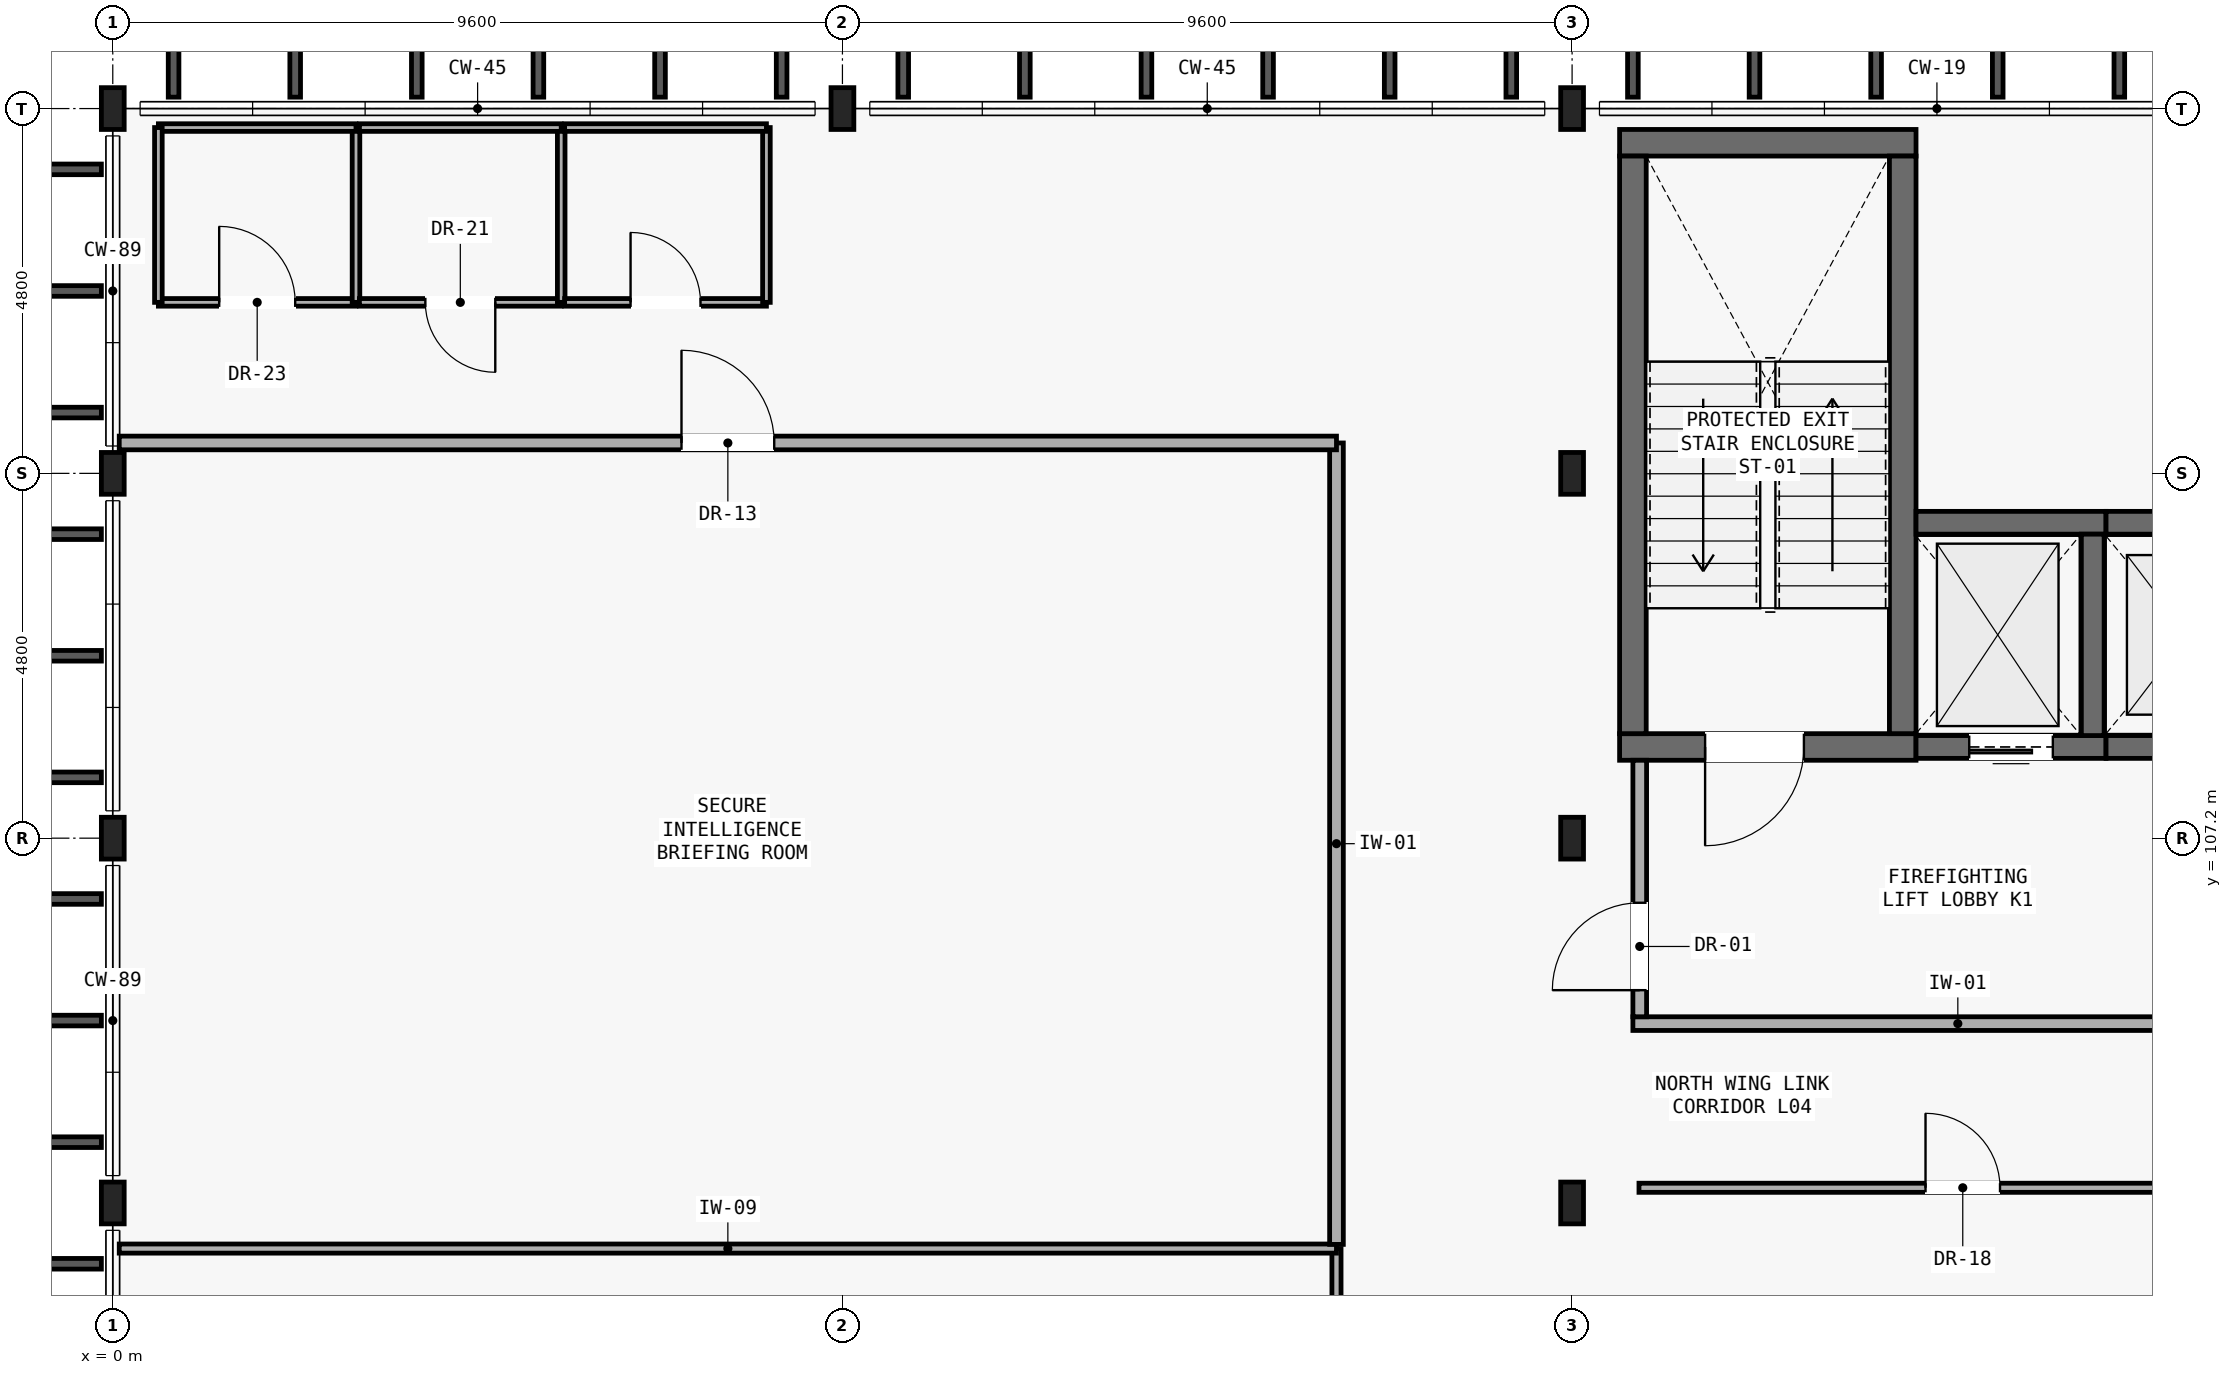
"""IFC4 building model, lengths in metres.
Left out: names, types, materials, properties, quantities, classifications, styles, units other than length and angle.
Written with IfcOpenShell. Run it as: python <this file> out.ifc"""

import sys

from ifc_helpers import new_model, si_unit, direction, frame, frame_2d, origin, origin_2d, place, context, subcontext, project, spatial, rectangle, i_section, extrude, element, fill, save


model = new_model("IFC4")
c1 = context("Model", 3, precision=1e-05, world=origin(), true_north=direction((0.0, 1.0)))
c2 = subcontext(c1, "Body", "Model", "MODEL_VIEW")
j1 = project(units=[si_unit("LENGTHUNIT", "METRE"), si_unit("PLANEANGLEUNIT", "RADIAN")], contexts=[c1])
p1 = place(None, origin())
s1 = spatial("IfcSite", under=j1, at=p1, CompositionType="ELEMENT")
p2 = place(p1, origin())
s2 = spatial("IfcBuilding", under=s1, at=p2, CompositionType="ELEMENT")
p3 = place(p2, frame((0.0, 0.0, 17.85)))
s3 = spatial("IfcBuildingStorey", under=s2, at=p3, CompositionType="ELEMENT", Elevation=17.85)
for number, where, z_axis, x_axis in (
    (1, (0.0, 102.4, 0.0), (0.0, 0.0, 1.0), (1.0, 0.0, 0.0)),
    (2, (0.0, 107.2, 0.0), (0.0, 0.0, 1.0), (1.0, 0.0, 0.0)),
    (3, (0.0, 112.0, 0.0), (0.0, 0.0, 1.0), (1.0, 0.0, 0.0)),
    (4, (0.0, 116.8, 0.0), (0.0, 0.0, 1.0), (1.0, 0.0, 0.0)),
    (5, (9.6, 116.8, 0.0), (0.0, 0.0, 1.0), (1.0, 0.0, 0.0)),
    (6, (19.2, 116.8, 0.0), (0.0, 0.0, 1.0), (1.0, 0.0, 0.0)),
    (7, (19.2, 102.4, 0.0), (0.0, 0.0, 1.0), (1.0, 0.0, 0.0)),
    (8, (19.2, 107.2, 0.0), (0.0, 0.0, 1.0), (1.0, 0.0, 0.0)),
    (9, (19.2, 112.0, 0.0), (0.0, 0.0, 1.0), (1.0, 0.0, 0.0)),
):
    element("IfcColumn", number, at=place(p3, frame(where, z_axis=z_axis, x_axis=x_axis)), inside=s3, PredefinedType="COLUMN", context=c2, shape_type="SweptSolid", body=[
        extrude(i_section(OverallWidth=0.3, OverallDepth=0.55, WebThickness=0.015, FlangeThickness=0.029, FilletRadius=0.027, at=origin_2d()), origin(), (0.0, 0.0, 1.0), 4.2),
    ])
p4 = place(p3, frame((19.825, 108.4, 0.0), z_axis=(0.0, 0.0, 1.0), x_axis=(1.0, 0.0, 0.0)))
e10 = element("IfcWall", 10, at=p4, inside=s3, PredefinedType="SHEAR", context=c2, shape_type="SweptSolid", body=[
    extrude(rectangle(XDim=3.9, YDim=0.35, at=frame_2d((1.95, 0.0))), origin(), (0.0, 0.0, 1.0), 3.99),
])
p5 = place(p4, frame((1.125, 0.0, 0.0)))
e11 = element("IfcOpeningElement", 11, at=p5, cuts=e10, PredefinedType="OPENING", context=c2, shape_type="SweptSolid", body=[
    extrude(rectangle(XDim=1.3, YDim=2.15, at=frame_2d((0.65, 1.075))), frame((0.0, 0.185, 0.0), z_axis=(0.0, -1.0, 0.0), x_axis=(1.0, 0.0, 0.0)), (0.0, 0.0, 1.0), 0.37),
])
p6 = place(p3, frame((19.825, 116.35, 0.0), z_axis=(0.0, 0.0, 1.0), x_axis=(1.0, 0.0, 0.0)))
e12 = element("IfcWall", 12, at=p6, inside=s3, PredefinedType="SHEAR", context=c2, shape_type="SweptSolid", body=[
    extrude(rectangle(XDim=3.9, YDim=0.35, at=frame_2d((1.95, 0.0))), origin(), (0.0, 0.0, 1.0), 3.99),
])
for number, where, z_axis, x_axis in (
    (13, (20.0, 108.575, 0.0), (0.0, 0.0, 1.0), (0.0, 1.0, 0.0)),
    (14, (23.55, 108.575, 0.0), (0.0, 0.0, 1.0), (0.0, 1.0, 0.0)),
):
    element("IfcWall", number, at=place(p3, frame(where, z_axis=z_axis, x_axis=x_axis)), inside=s3, PredefinedType="SHEAR", context=c2, shape_type="SweptSolid", body=[
        extrude(rectangle(XDim=7.6, YDim=0.35, at=frame_2d((3.8, 0.0))), origin(), (0.0, 0.0, 1.0), 3.99),
    ])
p7 = place(p3, frame((23.725, 108.4, 0.0), z_axis=(0.0, 0.0, 1.0), x_axis=(1.0, 0.0, 0.0)))
e15 = element("IfcWall", 15, at=p7, inside=s3, PredefinedType="SHEAR", context=c2, shape_type="SweptSolid", body=[
    extrude(rectangle(XDim=2.5, YDim=0.3, at=frame_2d((1.25, 0.0))), origin(), (0.0, 0.0, 1.0), 3.99),
])
p8 = place(p7, frame((0.7, 0.0, 0.0)))
e16 = element("IfcOpeningElement", 16, at=p8, cuts=e15, PredefinedType="OPENING", context=c2, shape_type="SweptSolid", body=[
    extrude(rectangle(XDim=1.1, YDim=2.1, at=frame_2d((0.55, 1.05))), frame((0.0, 0.16, 0.0), z_axis=(0.0, -1.0, 0.0), x_axis=(1.0, 0.0, 0.0)), (0.0, 0.0, 1.0), 0.32),
])
p9 = place(p3, frame((23.725, 111.35, 0.0), z_axis=(0.0, 0.0, 1.0), x_axis=(1.0, 0.0, 0.0)))
e17 = element("IfcWall", 17, at=p9, inside=s3, PredefinedType="SHEAR", context=c2, shape_type="SweptSolid", body=[
    extrude(rectangle(XDim=2.5, YDim=0.3, at=frame_2d((1.25, 0.0))), origin(), (0.0, 0.0, 1.0), 3.99),
])
p10 = place(p3, frame((26.05, 108.55, 0.0), z_axis=(0.0, 0.0, 1.0), x_axis=(0.0, 1.0, 0.0)))
e18 = element("IfcWall", 18, at=p10, inside=s3, PredefinedType="SHEAR", context=c2, shape_type="SweptSolid", body=[
    extrude(rectangle(XDim=2.65, YDim=0.3, at=frame_2d((1.325, 0.0))), origin(), (0.0, 0.0, 1.0), 3.99),
])
p11 = place(p3, frame((26.225, 108.4, 0.0), z_axis=(0.0, 0.0, 1.0), x_axis=(1.0, 0.0, 0.0)))
e19 = element("IfcWall", 19, at=p11, inside=s3, PredefinedType="SHEAR", context=c2, shape_type="SweptSolid", body=[
    extrude(rectangle(XDim=2.5, YDim=0.3, at=frame_2d((1.25, 0.0))), origin(), (0.0, 0.0, 1.0), 3.99),
])
p12 = place(p11, frame((0.7, 0.0, 0.0)))
e20 = element("IfcOpeningElement", 20, at=p12, cuts=e19, PredefinedType="OPENING", context=c2, shape_type="SweptSolid", body=[
    extrude(rectangle(XDim=1.1, YDim=2.1, at=frame_2d((0.55, 1.05))), frame((0.0, 0.16, 0.0), z_axis=(0.0, -1.0, 0.0), x_axis=(1.0, 0.0, 0.0)), (0.0, 0.0, 1.0), 0.32),
])
p13 = place(p3, frame((26.225, 111.35, 0.0), z_axis=(0.0, 0.0, 1.0), x_axis=(1.0, 0.0, 0.0)))
e21 = element("IfcWall", 21, at=p13, inside=s3, PredefinedType="SHEAR", context=c2, shape_type="SweptSolid", body=[
    extrude(rectangle(XDim=2.5, YDim=0.3, at=frame_2d((1.25, 0.0))), origin(), (0.0, 0.0, 1.0), 3.99),
])
p14 = place(p3, frame((20.0, 104.76, 0.0), z_axis=(0.0, 0.0, 1.0), x_axis=(1.0, 0.0, 0.0)))
e22 = element("IfcWall", 22, at=p14, inside=s3, PredefinedType="PARTITIONING", context=c2, shape_type="SweptSolid", body=[
    extrude(rectangle(XDim=8.55, YDim=0.18, at=frame_2d((4.275, 0.0))), origin(), (0.0, 0.0, 1.0), 3.47),
])
p15 = place(p3, frame((20.09, 104.85, 0.0), z_axis=(0.0, 0.0, 1.0), x_axis=(0.0, 1.0, 0.0)))
e23 = element("IfcWall", 23, at=p15, inside=s3, PredefinedType="PARTITIONING", context=c2, shape_type="SweptSolid", body=[
    extrude(rectangle(XDim=3.375, YDim=0.18, at=frame_2d((1.688, 0.0))), origin(), (0.0, 0.0, 1.0), 3.99),
])
p16 = place(p15, frame((0.35, 0.0, 0.0)))
e24 = element("IfcOpeningElement", 24, at=p16, cuts=e23, PredefinedType="OPENING", context=c2, shape_type="SweptSolid", body=[
    extrude(rectangle(XDim=1.15, YDim=2.15, at=frame_2d((0.575, 1.075))), frame((0.0, 0.1, 0.0), z_axis=(0.0, -1.0, 0.0), x_axis=(1.0, 0.0, 0.0)), (0.0, 0.0, 1.0), 0.2),
])
p17 = place(p3, frame((16.1, 83.4, 0.0), z_axis=(0.0, 0.0, 1.0), x_axis=(0.0, 1.0, 0.0)))
e25 = element("IfcWall", 25, at=p17, inside=s3, PredefinedType="PARTITIONING", context=c2, shape_type="SweptSolid", body=[
    extrude(rectangle(XDim=18.4, YDim=0.12, at=frame_2d((9.2, 0.0))), origin(), (0.0, 0.0, 1.0), 3.99),
])
p18 = place(p17, frame((8.69, 0.0, 0.0)))
e26 = element("IfcOpeningElement", 26, at=p18, cuts=e25, PredefinedType="OPENING", context=c2, shape_type="SweptSolid", body=[
    extrude(rectangle(XDim=1.02, YDim=2.1, at=frame_2d((0.51, 1.05))), frame((0.0, 0.07, 0.0), z_axis=(0.0, -1.0, 0.0), x_axis=(1.0, 0.0, 0.0)), (0.0, 0.0, 1.0), 0.14),
])
p19 = place(p3, frame((16.1, 101.8, 0.0), z_axis=(0.0, 0.0, 1.0), x_axis=(-1.0, 0.0, 0.0)))
e27 = element("IfcWall", 27, at=p19, inside=s3, PredefinedType="PARTITIONING", context=c2, shape_type="SweptSolid", body=[
    extrude(rectangle(XDim=16.015, YDim=0.12, at=frame_2d((8.008, 0.0))), origin(), (0.0, 0.0, 1.0), 3.99),
])
p20 = place(p3, frame((16.1, 101.855, 0.0), z_axis=(0.0, 0.0, 1.0), x_axis=(0.0, 1.0, 0.0)))
e28 = element("IfcWall", 28, at=p20, inside=s3, PredefinedType="PARTITIONING", context=c2, shape_type="SweptSolid", body=[
    extrude(rectangle(XDim=10.545, YDim=0.18, at=frame_2d((5.272, 0.0))), origin(), (0.0, 0.0, 1.0), 3.99),
])
p21 = place(p3, frame((16.1, 112.4, 0.0), z_axis=(0.0, 0.0, 1.0), x_axis=(-1.0, 0.0, 0.0)))
e29 = element("IfcWall", 29, at=p21, inside=s3, PredefinedType="PARTITIONING", context=c2, shape_type="SweptSolid", body=[
    extrude(rectangle(XDim=16.015, YDim=0.18, at=frame_2d((8.008, 0.0))), origin(), (0.0, 0.0, 1.0), 3.99),
])
p22 = place(p21, frame((7.397, 0.0, 0.0)))
e30 = element("IfcOpeningElement", 30, at=p22, cuts=e29, PredefinedType="OPENING", context=c2, shape_type="SweptSolid", body=[
    extrude(rectangle(XDim=1.22, YDim=2.1, at=frame_2d((0.61, 1.05))), frame((0.0, 0.1, 0.0), z_axis=(0.0, -1.0, 0.0), x_axis=(1.0, 0.0, 0.0)), (0.0, 0.0, 1.0), 0.2),
])
p23 = place(p3, frame((0.6, 114.25, 0.0), z_axis=(0.0, 0.0, 1.0), x_axis=(1.0, 0.0, 0.0)))
e31 = element("IfcWall", 31, at=p23, inside=s3, PredefinedType="PARTITIONING", context=c2, shape_type="SweptSolid", body=[
    extrude(rectangle(XDim=2.6, YDim=0.1, at=frame_2d((1.3, 0.0))), origin(), (0.0, 0.0, 1.0), 3.47),
])
p24 = place(p23, frame((0.8, 0.0, 0.0)))
e32 = element("IfcOpeningElement", 32, at=p24, cuts=e31, PredefinedType="OPENING", context=c2, shape_type="SweptSolid", body=[
    extrude(rectangle(XDim=1.0, YDim=2.08, at=frame_2d((0.5, 1.04))), frame((0.0, 0.06, 0.0), z_axis=(0.0, -1.0, 0.0), x_axis=(1.0, 0.0, 0.0)), (0.0, 0.0, 1.0), 0.12),
])
p25 = place(p3, frame((3.2, 114.25, 0.0), z_axis=(0.0, 0.0, 1.0), x_axis=(0.0, 1.0, 0.0)))
e33 = element("IfcWall", 33, at=p25, inside=s3, PredefinedType="PARTITIONING", context=c2, shape_type="SweptSolid", body=[
    extrude(rectangle(XDim=2.3, YDim=0.1, at=frame_2d((1.15, 0.0))), origin(), (0.0, 0.0, 1.0), 3.99),
])
p26 = place(p3, frame((3.2, 116.55, 0.0), z_axis=(0.0, 0.0, 1.0), x_axis=(-1.0, 0.0, 0.0)))
e34 = element("IfcWall", 34, at=p26, inside=s3, PredefinedType="PARTITIONING", context=c2, shape_type="SweptSolid", body=[
    extrude(rectangle(XDim=2.6, YDim=0.1, at=frame_2d((1.3, 0.0))), origin(), (0.0, 0.0, 1.0), 3.17),
])
p27 = place(p3, frame((0.6, 116.55, 0.0), z_axis=(0.0, 0.0, 1.0), x_axis=(0.0, -1.0, 0.0)))
e35 = element("IfcWall", 35, at=p27, inside=s3, PredefinedType="PARTITIONING", context=c2, shape_type="SweptSolid", body=[
    extrude(rectangle(XDim=2.3, YDim=0.1, at=frame_2d((1.15, 0.0))), origin(), (0.0, 0.0, 1.0), 3.99),
])
p28 = place(p3, frame((3.245, 114.25, 0.0), z_axis=(0.0, 0.0, 1.0), x_axis=(1.0, 0.0, 0.0)))
e36 = element("IfcWall", 36, at=p28, inside=s3, PredefinedType="PARTITIONING", context=c2, shape_type="SweptSolid", body=[
    extrude(rectangle(XDim=2.655, YDim=0.1, at=frame_2d((1.327, 0.0))), origin(), (0.0, 0.0, 1.0), 3.47),
])
p29 = place(p28, frame((0.867, 0.0, 0.0)))
e37 = element("IfcOpeningElement", 37, at=p29, cuts=e36, PredefinedType="OPENING", context=c2, shape_type="SweptSolid", body=[
    extrude(rectangle(XDim=0.92, YDim=2.08, at=frame_2d((0.46, 1.04))), frame((0.0, 0.06, 0.0), z_axis=(0.0, -1.0, 0.0), x_axis=(1.0, 0.0, 0.0)), (0.0, 0.0, 1.0), 0.12),
])
p30 = place(p3, frame((5.9, 114.25, 0.0), z_axis=(0.0, 0.0, 1.0), x_axis=(0.0, 1.0, 0.0)))
e38 = element("IfcWall", 38, at=p30, inside=s3, PredefinedType="PARTITIONING", context=c2, shape_type="SweptSolid", body=[
    extrude(rectangle(XDim=2.3, YDim=0.1, at=frame_2d((1.15, 0.0))), origin(), (0.0, 0.0, 1.0), 3.99),
])
p31 = place(p3, frame((5.9, 116.55, 0.0), z_axis=(0.0, 0.0, 1.0), x_axis=(-1.0, 0.0, 0.0)))
e39 = element("IfcWall", 39, at=p31, inside=s3, PredefinedType="PARTITIONING", context=c2, shape_type="SweptSolid", body=[
    extrude(rectangle(XDim=2.655, YDim=0.1, at=frame_2d((1.327, 0.0))), origin(), (0.0, 0.0, 1.0), 3.17),
])
p32 = place(p3, frame((5.945, 114.25, 0.0), z_axis=(0.0, 0.0, 1.0), x_axis=(1.0, 0.0, 0.0)))
e40 = element("IfcWall", 40, at=p32, inside=s3, PredefinedType="PARTITIONING", context=c2, shape_type="SweptSolid", body=[
    extrude(rectangle(XDim=2.655, YDim=0.1, at=frame_2d((1.328, 0.0))), origin(), (0.0, 0.0, 1.0), 3.47),
])
p33 = place(p32, frame((0.867, 0.0, 0.0)))
e41 = element("IfcOpeningElement", 41, at=p33, cuts=e40, PredefinedType="OPENING", context=c2, shape_type="SweptSolid", body=[
    extrude(rectangle(XDim=0.92, YDim=2.08, at=frame_2d((0.46, 1.04))), frame((0.0, 0.06, 0.0), z_axis=(0.0, -1.0, 0.0), x_axis=(1.0, 0.0, 0.0)), (0.0, 0.0, 1.0), 0.12),
])
p34 = place(p3, frame((8.6, 114.25, 0.0), z_axis=(0.0, 0.0, 1.0), x_axis=(0.0, 1.0, 0.0)))
e42 = element("IfcWall", 42, at=p34, inside=s3, PredefinedType="PARTITIONING", context=c2, shape_type="SweptSolid", body=[
    extrude(rectangle(XDim=2.3, YDim=0.1, at=frame_2d((1.15, 0.0))), origin(), (0.0, 0.0, 1.0), 3.99),
])
p35 = place(p3, frame((8.6, 116.55, 0.0), z_axis=(0.0, 0.0, 1.0), x_axis=(-1.0, 0.0, 0.0)))
e43 = element("IfcWall", 43, at=p35, inside=s3, PredefinedType="PARTITIONING", context=c2, shape_type="SweptSolid", body=[
    extrude(rectangle(XDim=2.655, YDim=0.1, at=frame_2d((1.328, 0.0))), origin(), (0.0, 0.0, 1.0), 3.17),
])
p36 = place(p3, frame((28.6, 102.6, 0.0), z_axis=(0.0, 0.0, 1.0), x_axis=(-1.0, 0.0, 0.0)))
e44 = element("IfcWall", 44, at=p36, inside=s3, PredefinedType="PARTITIONING", context=c2, shape_type="SweptSolid", body=[
    extrude(rectangle(XDim=8.52, YDim=0.12, at=frame_2d((4.26, 0.0))), origin(), (0.0, 0.0, 1.0), 3.165),
])
p37 = place(p36, frame((3.77, 0.0, 0.0)))
e45 = element("IfcOpeningElement", 45, at=p37, cuts=e44, PredefinedType="OPENING", context=c2, shape_type="SweptSolid", body=[
    extrude(rectangle(XDim=0.98, YDim=2.1, at=frame_2d((0.49, 1.05))), frame((0.0, 0.07, 0.0), z_axis=(0.0, -1.0, 0.0), x_axis=(1.0, 0.0, 0.0)), (0.0, 0.0, 1.0), 0.14),
])
p38 = place(p5, frame((1.3, 0.0, 0.0), z_axis=(0.0, 0.0, 1.0), x_axis=(-1.0, 0.0, 0.0)))
e46 = element("IfcDoor", 46, at=p38, inside=s3, OperationType="SINGLE_SWING_LEFT", PredefinedType="DOOR", context=c2, shape_type="SweptSolid", body=[
    extrude(rectangle(XDim=1.3, YDim=2.15, at=frame_2d((0.65, 1.075))), frame((0.0, 0.025, 0.0), z_axis=(0.0, -1.0, 0.0), x_axis=(1.0, 0.0, 0.0)), (0.0, 0.0, 1.0), 0.05),
])
fill(e11, e46)
p39 = place(p8, frame((1.1, 0.0, 0.0), z_axis=(0.0, 0.0, 1.0), x_axis=(-1.0, 0.0, 0.0)))
e47 = element("IfcDoor", 47, at=p39, inside=s3, OperationType="SLIDING_TO_LEFT", PredefinedType="DOOR", context=c2, shape_type="SweptSolid", body=[
    extrude(rectangle(XDim=1.1, YDim=2.1, at=frame_2d((0.55, 1.05))), frame((0.0, 0.025, 0.0), z_axis=(0.0, -1.0, 0.0), x_axis=(1.0, 0.0, 0.0)), (0.0, 0.0, 1.0), 0.05),
])
fill(e16, e47)
p40 = place(p16, origin())
e48 = element("IfcDoor", 48, at=p40, inside=s3, OperationType="SINGLE_SWING_LEFT", PredefinedType="DOOR", context=c2, shape_type="SweptSolid", body=[
    extrude(rectangle(XDim=1.15, YDim=2.15, at=frame_2d((0.575, 1.075))), frame((0.0, 0.025, 0.0), z_axis=(0.0, -1.0, 0.0), x_axis=(1.0, 0.0, 0.0)), (0.0, 0.0, 1.0), 0.05),
])
fill(e24, e48)
p41 = place(p22, frame((1.22, 0.0, 0.0), z_axis=(0.0, 0.0, 1.0), x_axis=(-1.0, 0.0, 0.0)))
e49 = element("IfcDoor", 49, at=p41, inside=s3, OperationType="SINGLE_SWING_RIGHT", PredefinedType="DOOR", context=c2, shape_type="SweptSolid", body=[
    extrude(rectangle(XDim=1.22, YDim=2.1, at=frame_2d((0.61, 1.05))), frame((0.0, 0.025, 0.0), z_axis=(0.0, -1.0, 0.0), x_axis=(1.0, 0.0, 0.0)), (0.0, 0.0, 1.0), 0.05),
])
fill(e30, e49)
p42 = place(p24, origin())
e50 = element("IfcDoor", 50, at=p42, inside=s3, OperationType="SINGLE_SWING_LEFT", PredefinedType="DOOR", context=c2, shape_type="SweptSolid", body=[
    extrude(rectangle(XDim=1.0, YDim=2.08, at=frame_2d((0.5, 1.04))), frame((0.0, 0.025, 0.0), z_axis=(0.0, -1.0, 0.0), x_axis=(1.0, 0.0, 0.0)), (0.0, 0.0, 1.0), 0.05),
])
fill(e32, e50)
p43 = place(p29, frame((0.92, 0.0, 0.0), z_axis=(0.0, 0.0, 1.0), x_axis=(-1.0, 0.0, 0.0)))
e51 = element("IfcDoor", 51, at=p43, inside=s3, OperationType="SINGLE_SWING_RIGHT", PredefinedType="DOOR", context=c2, shape_type="SweptSolid", body=[
    extrude(rectangle(XDim=0.92, YDim=2.08, at=frame_2d((0.46, 1.04))), frame((0.0, 0.025, 0.0), z_axis=(0.0, -1.0, 0.0), x_axis=(1.0, 0.0, 0.0)), (0.0, 0.0, 1.0), 0.05),
])
fill(e37, e51)
p44 = place(p33, origin())
e52 = element("IfcDoor", 52, at=p44, inside=s3, OperationType="SINGLE_SWING_LEFT", PredefinedType="DOOR", context=c2, shape_type="SweptSolid", body=[
    extrude(rectangle(XDim=0.92, YDim=2.08, at=frame_2d((0.46, 1.04))), frame((0.0, 0.025, 0.0), z_axis=(0.0, -1.0, 0.0), x_axis=(1.0, 0.0, 0.0)), (0.0, 0.0, 1.0), 0.05),
])
fill(e41, e52)
p45 = place(p37, frame((0.98, 0.0, 0.0), z_axis=(0.0, 0.0, 1.0), x_axis=(-1.0, 0.0, 0.0)))
e53 = element("IfcDoor", 53, at=p45, inside=s3, OperationType="SINGLE_SWING_RIGHT", PredefinedType="DOOR", context=c2, shape_type="SweptSolid", body=[
    extrude(rectangle(XDim=0.98, YDim=2.1, at=frame_2d((0.49, 1.05))), frame((0.0, 0.025, 0.0), z_axis=(0.0, -1.0, 0.0), x_axis=(1.0, 0.0, 0.0)), (0.0, 0.0, 1.0), 0.05),
])
fill(e45, e53)
save(model, sys.argv[1])
